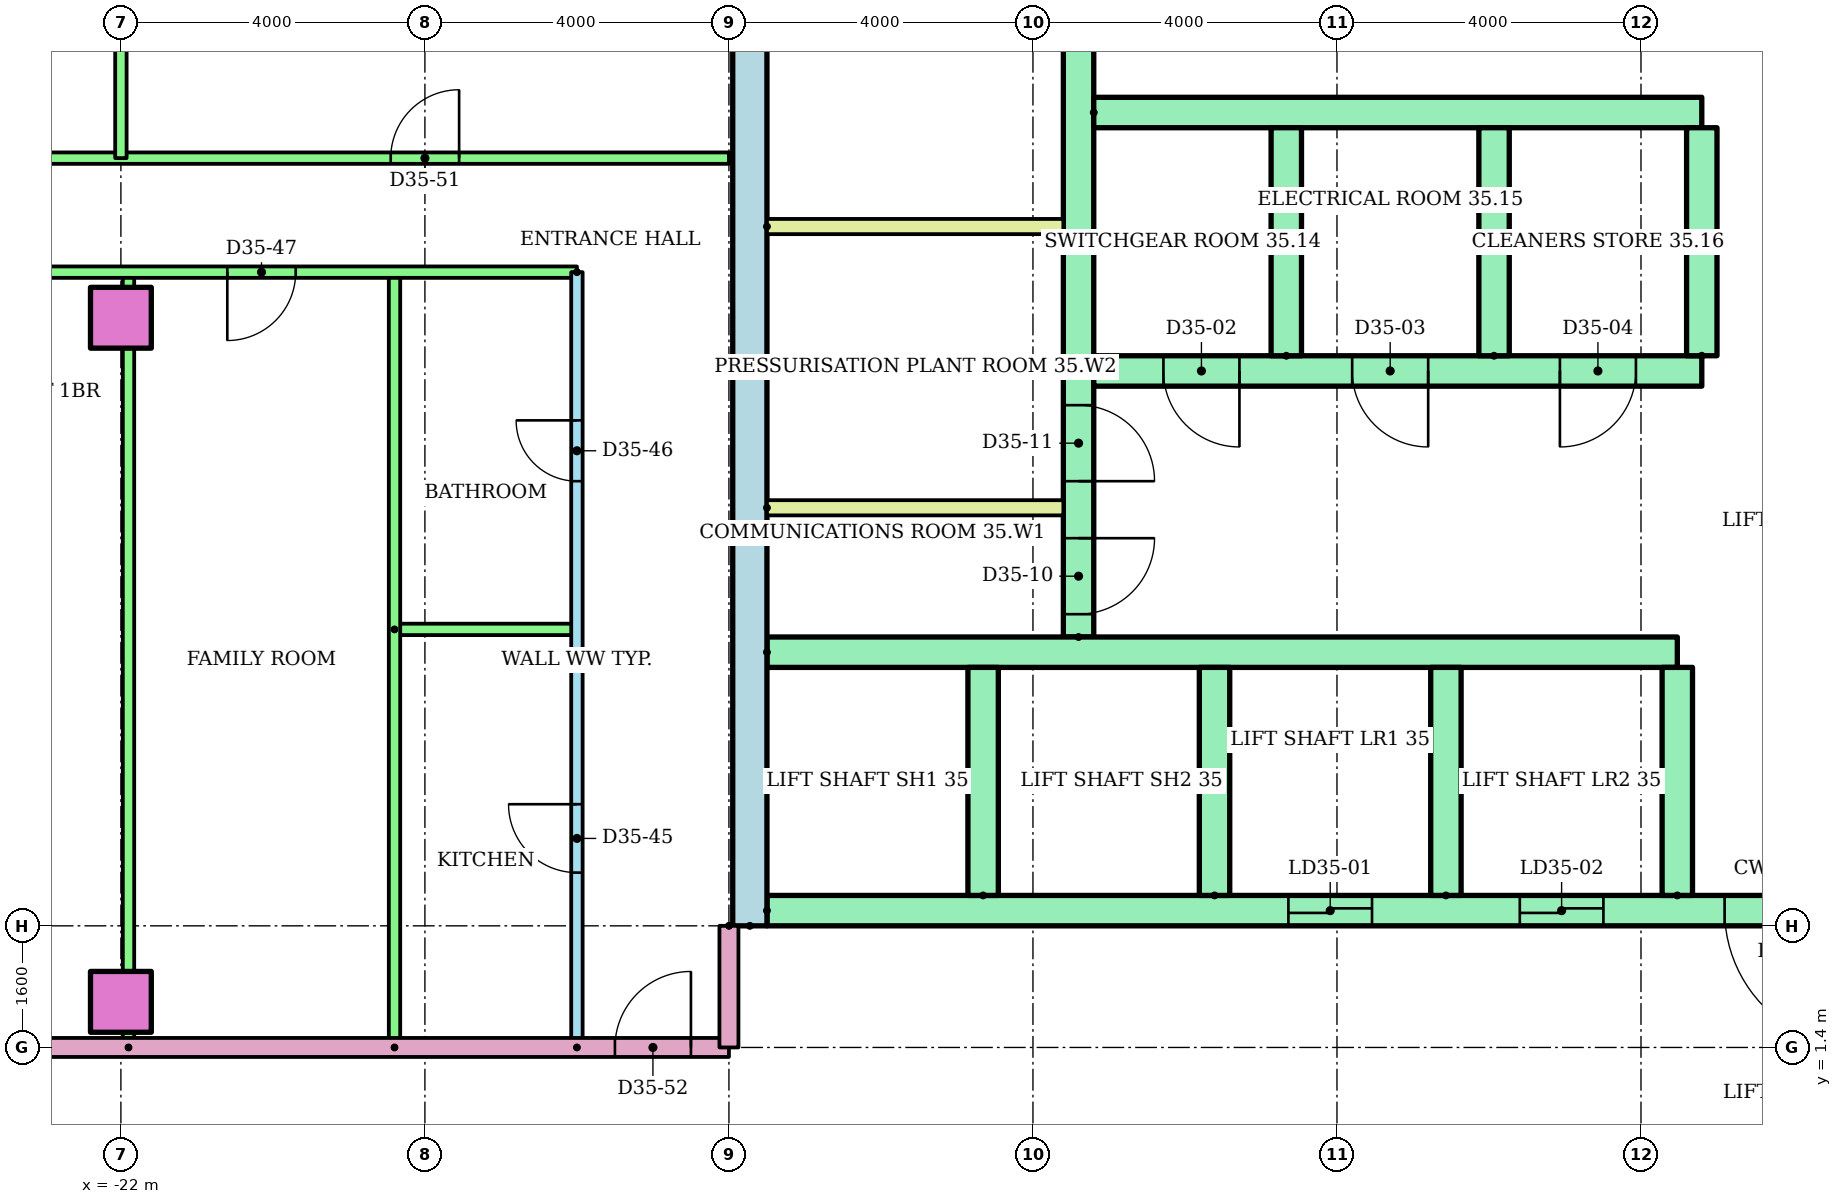
"""IFC4 building model, lengths in metres.
Left out: names, types, materials, properties, quantities, classifications, styles, units other than length and angle.
Written with IfcOpenShell. Run it as: python <this file> out.ifc"""

import sys

from ifc_helpers import new_model, si_unit, direction, frame, frame_2d, origin, origin_2d, place, context, subcontext, project, spatial, rectangle, extrude, element, fill, save


model = new_model("IFC4")
c1 = context("Model", 3, precision=1e-05, world=origin(), true_north=direction((0.0, 1.0)))
c2 = subcontext(c1, "Body", "Model", "MODEL_VIEW")
j1 = project(units=[si_unit("LENGTHUNIT", "METRE"), si_unit("PLANEANGLEUNIT", "RADIAN")], contexts=[c1])
p1 = place(None, origin())
s1 = spatial("IfcSite", under=j1, at=p1, CompositionType="ELEMENT")
p2 = place(p1, origin())
s2 = spatial("IfcBuilding", under=s1, at=p2, CompositionType="ELEMENT")
p3 = place(p2, frame((0.0, 0.0, 135.8)))
s3 = spatial("IfcBuildingStorey", under=s2, at=p3, CompositionType="ELEMENT", Elevation=135.8)
for number, where in (
    (1, (-22.0, 2.0, 0.0)),
    (2, (-22.0, 11.0, 0.0)),
):
    element("IfcColumn", number, at=place(p3, frame(where)), inside=s3, PredefinedType="COLUMN", context=c2, shape_type="SweptSolid", body=[
        extrude(rectangle(XDim=0.8, YDim=0.8, at=origin_2d()), origin(), (0.0, 0.0, 1.0), 3.2),
    ])
p4 = place(p3, frame((-13.725, 3.0, 0.0), z_axis=(0.0, 0.0, 1.0), x_axis=(0.0, 1.0, 0.0)))
e3 = element("IfcWall", 3, at=p4, inside=s3, PredefinedType="SHEAR", context=c2, shape_type="SweptSolid", body=[
    extrude(rectangle(XDim=17.0, YDim=0.45, at=frame_2d((8.5, 0.0))), origin(), (0.0, 0.0, 1.0), 2.92),
])
p5 = place(p3, frame((-9.4, 6.8, 0.0), z_axis=(0.0, 0.0, 1.0), x_axis=(0.0, 1.0, 0.0)))
e4 = element("IfcWall", 4, at=p5, inside=s3, PredefinedType="SHEAR", context=c2, shape_type="SweptSolid", body=[
    extrude(rectangle(XDim=12.7, YDim=0.4, at=frame_2d((6.35, 0.0))), origin(), (0.0, 0.0, 1.0), 2.92),
])
p6 = place(p5, frame((0.3, 0.0, 0.0)))
e5 = element("IfcOpeningElement", 5, at=p6, cuts=e4, PredefinedType="OPENING", context=c2, shape_type="SweptSolid", body=[
    extrude(rectangle(XDim=1.0, YDim=2.1, at=frame_2d((0.5, 1.05))), frame((0.0, 0.21, 0.0), z_axis=(0.0, -1.0, 0.0), x_axis=(1.0, 0.0, 0.0)), (0.0, 0.0, 1.0), 0.42),
])
p7 = place(p5, frame((2.05, 0.0, 0.0)))
e6 = element("IfcOpeningElement", 6, at=p7, cuts=e4, PredefinedType="OPENING", context=c2, shape_type="SweptSolid", body=[
    extrude(rectangle(XDim=1.0, YDim=2.1, at=frame_2d((0.5, 1.05))), frame((0.0, 0.21, 0.0), z_axis=(0.0, -1.0, 0.0), x_axis=(1.0, 0.0, 0.0)), (0.0, 0.0, 1.0), 0.42),
])
p8 = place(p5, frame((7.925, 0.0, 0.0)))
e7 = element("IfcOpeningElement", 7, at=p8, cuts=e4, PredefinedType="OPENING", context=c2, shape_type="SweptSolid", body=[
    extrude(rectangle(XDim=1.0, YDim=2.1, at=frame_2d((0.5, 1.05))), frame((0.0, 0.21, 0.0), z_axis=(0.0, -1.0, 0.0), x_axis=(1.0, 0.0, 0.0)), (0.0, 0.0, 1.0), 0.42),
])
p9 = place(p3, frame((-13.5, 3.2, 0.0)))
e8 = element("IfcWall", 8, at=p9, inside=s3, PredefinedType="SHEAR", context=c2, shape_type="SweptSolid", body=[
    extrude(rectangle(XDim=27.0, YDim=0.4, at=frame_2d((13.5, 0.0))), origin(), (0.0, 0.0, 1.0), 2.92),
])
p10 = place(p9, frame((6.861, 0.0, 0.0)))
e9 = element("IfcOpeningElement", 9, at=p10, cuts=e8, PredefinedType="OPENING", context=c2, shape_type="SweptSolid", body=[
    extrude(rectangle(XDim=1.1, YDim=2.1, at=frame_2d((0.55, 1.05))), frame((0.0, 0.21, 0.0), z_axis=(0.0, -1.0, 0.0), x_axis=(1.0, 0.0, 0.0)), (0.0, 0.0, 1.0), 0.42),
])
p11 = place(p9, frame((9.906, 0.0, 0.0)))
e10 = element("IfcOpeningElement", 10, at=p11, cuts=e8, PredefinedType="OPENING", context=c2, shape_type="SweptSolid", body=[
    extrude(rectangle(XDim=1.1, YDim=2.1, at=frame_2d((0.55, 1.05))), frame((0.0, 0.21, 0.0), z_axis=(0.0, -1.0, 0.0), x_axis=(1.0, 0.0, 0.0)), (0.0, 0.0, 1.0), 0.42),
])
p12 = place(p9, frame((15.994, 0.0, 0.0)))
e11 = element("IfcOpeningElement", 11, at=p12, cuts=e8, PredefinedType="OPENING", context=c2, shape_type="SweptSolid", body=[
    extrude(rectangle(XDim=1.1, YDim=2.1, at=frame_2d((0.55, 1.05))), frame((0.0, 0.21, 0.0), z_axis=(0.0, -1.0, 0.0), x_axis=(1.0, 0.0, 0.0)), (0.0, 0.0, 1.0), 0.42),
])
p13 = place(p9, frame((19.039, 0.0, 0.0)))
e12 = element("IfcOpeningElement", 12, at=p13, cuts=e8, PredefinedType="OPENING", context=c2, shape_type="SweptSolid", body=[
    extrude(rectangle(XDim=1.1, YDim=2.1, at=frame_2d((0.55, 1.05))), frame((0.0, 0.21, 0.0), z_axis=(0.0, -1.0, 0.0), x_axis=(1.0, 0.0, 0.0)), (0.0, 0.0, 1.0), 0.42),
])
p14 = place(p9, frame((12.6, 0.0, 0.0)))
e13 = element("IfcOpeningElement", 13, at=p14, cuts=e8, PredefinedType="OPENING", context=c2, shape_type="SweptSolid", body=[
    extrude(rectangle(XDim=1.8, YDim=2.1, at=frame_2d((0.9, 1.05))), frame((0.0, 0.21, 0.0), z_axis=(0.0, -1.0, 0.0), x_axis=(1.0, 0.0, 0.0)), (0.0, 0.0, 1.0), 0.42),
])
p15 = place(p3, frame((-13.5, 6.6, 0.0)))
e14 = element("IfcWall", 14, at=p15, inside=s3, PredefinedType="SHEAR", context=c2, shape_type="SweptSolid", body=[
    extrude(rectangle(XDim=11.978, YDim=0.4, at=frame_2d((5.989, 0.0))), origin(), (0.0, 0.0, 1.0), 2.92),
])
for number, where, z_axis, x_axis in (
    (15, (-10.656, 3.4, 0.0), (0.0, 0.0, 1.0), (0.0, 1.0, 0.0)),
    (16, (-7.611, 3.4, 0.0), (0.0, 0.0, 1.0), (0.0, 1.0, 0.0)),
    (17, (-4.567, 3.4, 0.0), (0.0, 0.0, 1.0), (0.0, 1.0, 0.0)),
    (18, (-1.522, 3.4, 0.0), (0.0, 0.0, 1.0), (0.0, 1.0, 0.0)),
):
    element("IfcWall", number, at=place(p3, frame(where, z_axis=z_axis, x_axis=x_axis)), inside=s3, PredefinedType="SHEAR", context=c2, shape_type="SweptSolid", body=[
        extrude(rectangle(XDim=3.0, YDim=0.4, at=frame_2d((1.5, 0.0))), origin(), (0.0, 0.0, 1.0), 2.92),
    ])
p16 = place(p3, frame((-9.2, 10.3, 0.0)))
e19 = element("IfcWall", 19, at=p16, inside=s3, PredefinedType="SHEAR", context=c2, shape_type="SweptSolid", body=[
    extrude(rectangle(XDim=8.0, YDim=0.4, at=frame_2d((4.0, 0.0))), origin(), (0.0, 0.0, 1.0), 2.92),
])
p17 = place(p16, frame((0.917, 0.0, 0.0)))
e20 = element("IfcOpeningElement", 20, at=p17, cuts=e19, PredefinedType="OPENING", context=c2, shape_type="SweptSolid", body=[
    extrude(rectangle(XDim=1.0, YDim=2.1, at=frame_2d((0.5, 1.05))), frame((0.0, 0.21, 0.0), z_axis=(0.0, -1.0, 0.0), x_axis=(1.0, 0.0, 0.0)), (0.0, 0.0, 1.0), 0.42),
])
p18 = place(p16, frame((3.4, 0.0, 0.0)))
e21 = element("IfcOpeningElement", 21, at=p18, cuts=e19, PredefinedType="OPENING", context=c2, shape_type="SweptSolid", body=[
    extrude(rectangle(XDim=1.0, YDim=2.1, at=frame_2d((0.5, 1.05))), frame((0.0, 0.21, 0.0), z_axis=(0.0, -1.0, 0.0), x_axis=(1.0, 0.0, 0.0)), (0.0, 0.0, 1.0), 0.42),
])
p19 = place(p16, frame((6.133, 0.0, 0.0)))
e22 = element("IfcOpeningElement", 22, at=p19, cuts=e19, PredefinedType="OPENING", context=c2, shape_type="SweptSolid", body=[
    extrude(rectangle(XDim=1.0, YDim=2.1, at=frame_2d((0.5, 1.05))), frame((0.0, 0.21, 0.0), z_axis=(0.0, -1.0, 0.0), x_axis=(1.0, 0.0, 0.0)), (0.0, 0.0, 1.0), 0.42),
])
p20 = place(p3, frame((-9.2, 13.7, 0.0)))
e23 = element("IfcWall", 23, at=p20, inside=s3, PredefinedType="SHEAR", context=c2, shape_type="SweptSolid", body=[
    extrude(rectangle(XDim=8.0, YDim=0.4, at=frame_2d((4.0, 0.0))), origin(), (0.0, 0.0, 1.0), 2.92),
])
for number, where, z_axis, x_axis in (
    (24, (-6.667, 10.5, 0.0), (0.0, 0.0, 1.0), (0.0, 1.0, 0.0)),
    (25, (-3.933, 10.5, 0.0), (0.0, 0.0, 1.0), (0.0, 1.0, 0.0)),
    (26, (-1.2, 10.5, 0.0), (0.0, 0.0, 1.0), (0.0, 1.0, 0.0)),
):
    element("IfcWall", number, at=place(p3, frame(where, z_axis=z_axis, x_axis=x_axis)), inside=s3, PredefinedType="SHEAR", context=c2, shape_type="SweptSolid", body=[
        extrude(rectangle(XDim=3.0, YDim=0.4, at=frame_2d((1.5, 0.0))), origin(), (0.0, 0.0, 1.0), 2.92),
    ])
for number, where in (
    (27, (-13.5, 8.5, 0.0)),
    (28, (-13.5, 12.2, 0.0)),
):
    element("IfcWall", number, at=place(p3, frame(where)), inside=s3, PredefinedType="PARTITIONING", context=c2, shape_type="SweptSolid", body=[
        extrude(rectangle(XDim=3.9, YDim=0.2, at=frame_2d((1.95, 0.0))), origin(), (0.0, 0.0, 1.0), 2.92),
    ])
p21 = place(p3, frame((-16.0, 1.4, 0.0), z_axis=(0.0, 0.0, 1.0), x_axis=(0.0, 1.0, 0.0)))
e29 = element("IfcWall", 29, at=p21, inside=s3, PredefinedType="PARTITIONING", context=c2, shape_type="SweptSolid", body=[
    extrude(rectangle(XDim=10.2, YDim=0.15, at=frame_2d((5.1, 0.0))), origin(), (0.0, 0.0, 1.0), 2.4),
])
p22 = place(p21, frame((2.3, 0.0, 0.0)))
e30 = element("IfcOpeningElement", 30, at=p22, cuts=e29, PredefinedType="OPENING", context=c2, shape_type="SweptSolid", body=[
    extrude(rectangle(XDim=0.9, YDim=2.1, at=frame_2d((0.45, 1.05))), frame((0.0, 0.085, 0.0), z_axis=(0.0, -1.0, 0.0), x_axis=(1.0, 0.0, 0.0)), (0.0, 0.0, 1.0), 0.17),
])
p23 = place(p21, frame((7.45, 0.0, 0.0)))
e31 = element("IfcOpeningElement", 31, at=p23, cuts=e29, PredefinedType="OPENING", context=c2, shape_type="SweptSolid", body=[
    extrude(rectangle(XDim=0.8, YDim=2.1, at=frame_2d((0.4, 1.05))), frame((0.0, 0.085, 0.0), z_axis=(0.0, -1.0, 0.0), x_axis=(1.0, 0.0, 0.0)), (0.0, 0.0, 1.0), 0.17),
])
p24 = place(p3, frame((-18.4, 6.9, 0.0)))
e32 = element("IfcWall", 32, at=p24, inside=s3, PredefinedType="PARTITIONING", context=c2, shape_type="SweptSolid", body=[
    extrude(rectangle(XDim=2.4, YDim=0.15, at=frame_2d((1.2, 0.0))), origin(), (0.0, 0.0, 1.0), 2.4),
])
for number, where, z_axis, x_axis in (
    (33, (-18.4, 1.4, 0.0), (0.0, 0.0, 1.0), (0.0, 1.0, 0.0)),
    (34, (-21.9, 1.4, 0.0), (0.0, 0.0, 1.0), (0.0, 1.0, 0.0)),
):
    element("IfcWall", number, at=place(p3, frame(where, z_axis=z_axis, x_axis=x_axis)), inside=s3, PredefinedType="PARTITIONING", context=c2, shape_type="SweptSolid", body=[
        extrude(rectangle(XDim=10.2, YDim=0.15, at=frame_2d((5.1, 0.0))), origin(), (0.0, 0.0, 1.0), 2.4),
    ])
p25 = place(p3, frame((-16.0, 11.6, 0.0), z_axis=(0.0, 0.0, 1.0), x_axis=(-1.0, 0.0, 0.0)))
e35 = element("IfcWall", 35, at=p25, inside=s3, PredefinedType="PARTITIONING", context=c2, shape_type="SweptSolid", body=[
    extrude(rectangle(XDim=16.72, YDim=0.15, at=frame_2d((8.36, 0.0))), origin(), (0.0, 0.0, 1.0), 2.4),
])
p26 = place(p25, frame((3.7, 0.0, 0.0)))
e36 = element("IfcOpeningElement", 36, at=p26, cuts=e35, PredefinedType="OPENING", context=c2, shape_type="SweptSolid", body=[
    extrude(rectangle(XDim=0.9, YDim=2.1, at=frame_2d((0.45, 1.05))), frame((0.0, 0.085, 0.0), z_axis=(0.0, -1.0, 0.0), x_axis=(1.0, 0.0, 0.0)), (0.0, 0.0, 1.0), 0.17),
])
p27 = place(p25, frame((7.825, 0.0, 0.0)))
e37 = element("IfcOpeningElement", 37, at=p27, cuts=e35, PredefinedType="OPENING", context=c2, shape_type="SweptSolid", body=[
    extrude(rectangle(XDim=0.9, YDim=2.1, at=frame_2d((0.45, 1.05))), frame((0.0, 0.085, 0.0), z_axis=(0.0, -1.0, 0.0), x_axis=(1.0, 0.0, 0.0)), (0.0, 0.0, 1.0), 0.17),
])
p28 = place(p25, frame((12.482, 0.0, 0.0)))
e38 = element("IfcOpeningElement", 38, at=p28, cuts=e35, PredefinedType="OPENING", context=c2, shape_type="SweptSolid", body=[
    extrude(rectangle(XDim=0.9, YDim=2.1, at=frame_2d((0.45, 1.05))), frame((0.0, 0.085, 0.0), z_axis=(0.0, -1.0, 0.0), x_axis=(1.0, 0.0, 0.0)), (0.0, 0.0, 1.0), 0.17),
])
p29 = place(p3, frame((-32.72, 13.1, 0.0)))
e39 = element("IfcWall", 39, at=p29, inside=s3, PredefinedType="PARTITIONING", context=c2, shape_type="SweptSolid", body=[
    extrude(rectangle(XDim=18.72, YDim=0.15, at=frame_2d((9.36, 0.0))), origin(), (0.0, 0.0, 1.0), 2.4),
])
p30 = place(p29, frame((4.97, 0.0, 0.0)))
e40 = element("IfcOpeningElement", 40, at=p30, cuts=e39, PredefinedType="OPENING", context=c2, shape_type="SweptSolid", body=[
    extrude(rectangle(XDim=1.0, YDim=2.1, at=frame_2d((0.5, 1.05))), frame((0.0, 0.085, 0.0), z_axis=(0.0, -1.0, 0.0), x_axis=(1.0, 0.0, 0.0)), (0.0, 0.0, 1.0), 0.17),
])
p31 = place(p29, frame((14.27, 0.0, 0.0)))
e41 = element("IfcOpeningElement", 41, at=p31, cuts=e39, PredefinedType="OPENING", context=c2, shape_type="SweptSolid", body=[
    extrude(rectangle(XDim=0.9, YDim=2.1, at=frame_2d((0.45, 1.05))), frame((0.0, 0.085, 0.0), z_axis=(0.0, -1.0, 0.0), x_axis=(1.0, 0.0, 0.0)), (0.0, 0.0, 1.0), 0.17),
])
p32 = place(p3, frame((-22.0, 18.721, 0.0), z_axis=(0.0, 0.0, 1.0), x_axis=(0.0, -1.0, 0.0)))
e42 = element("IfcWall", 42, at=p32, inside=s3, PredefinedType="PARTITIONING", context=c2, shape_type="SweptSolid", body=[
    extrude(rectangle(XDim=5.621, YDim=0.15, at=frame_2d((2.811, 0.0))), origin(), (0.0, 0.0, 1.0), 2.4),
])
p33 = place(p3, frame((-29.0, 1.4, 0.0)))
e43 = element("IfcWall", 43, at=p33, inside=s3, PredefinedType="PARTITIONING", context=c2, shape_type="SweptSolid", body=[
    extrude(rectangle(XDim=15.0, YDim=0.25, at=frame_2d((7.5, 0.0))), origin(), (0.0, 0.0, 1.0), 2.4),
])
p34 = place(p33, frame((13.5, 0.0, 0.0)))
e44 = element("IfcOpeningElement", 44, at=p34, cuts=e43, PredefinedType="OPENING", context=c2, shape_type="SweptSolid", body=[
    extrude(rectangle(XDim=1.0, YDim=2.1, at=frame_2d((0.5, 1.05))), frame((0.0, 0.135, 0.0), z_axis=(0.0, -1.0, 0.0), x_axis=(1.0, 0.0, 0.0)), (0.0, 0.0, 1.0), 0.27),
])
p35 = place(p3, frame((-14.0, 3.0, 0.0), z_axis=(0.0, 0.0, 1.0), x_axis=(0.0, -1.0, 0.0)))
e45 = element("IfcWall", 45, at=p35, inside=s3, PredefinedType="PARTITIONING", context=c2, shape_type="SweptSolid", body=[
    extrude(rectangle(XDim=1.6, YDim=0.25, at=frame_2d((0.8, 0.0))), origin(), (0.0, 0.0, 1.0), 2.4),
])
p36 = place(p10, origin())
e46 = element("IfcDoor", 46, at=p36, inside=s3, OperationType="SLIDING_TO_LEFT", PredefinedType="DOOR", context=c2, shape_type="SweptSolid", body=[
    extrude(rectangle(XDim=1.1, YDim=2.1, at=frame_2d((0.55, 1.05))), frame((0.0, 0.025, 0.0), z_axis=(0.0, -1.0, 0.0), x_axis=(1.0, 0.0, 0.0)), (0.0, 0.0, 1.0), 0.05),
])
fill(e9, e46)
p37 = place(p11, origin())
e47 = element("IfcDoor", 47, at=p37, inside=s3, OperationType="SLIDING_TO_LEFT", PredefinedType="DOOR", context=c2, shape_type="SweptSolid", body=[
    extrude(rectangle(XDim=1.1, YDim=2.1, at=frame_2d((0.55, 1.05))), frame((0.0, 0.025, 0.0), z_axis=(0.0, -1.0, 0.0), x_axis=(1.0, 0.0, 0.0)), (0.0, 0.0, 1.0), 0.05),
])
fill(e10, e47)
p38 = place(p14, frame((1.8, 0.0, 0.0), z_axis=(0.0, 0.0, 1.0), x_axis=(-1.0, 0.0, 0.0)))
e48 = element("IfcDoor", 48, at=p38, inside=s3, OperationType="DOUBLE_DOOR_SINGLE_SWING", PredefinedType="DOOR", context=c2, shape_type="SweptSolid", body=[
    extrude(rectangle(XDim=1.8, YDim=2.1, at=frame_2d((0.9, 1.05))), frame((0.0, 0.025, 0.0), z_axis=(0.0, -1.0, 0.0), x_axis=(1.0, 0.0, 0.0)), (0.0, 0.0, 1.0), 0.05),
])
fill(e13, e48)
p39 = place(p17, frame((1.0, 0.0, 0.0), z_axis=(0.0, 0.0, 1.0), x_axis=(-1.0, 0.0, 0.0)))
e49 = element("IfcDoor", 49, at=p39, inside=s3, OperationType="SINGLE_SWING_RIGHT", PredefinedType="DOOR", context=c2, shape_type="SweptSolid", body=[
    extrude(rectangle(XDim=1.0, YDim=2.1, at=frame_2d((0.5, 1.05))), frame((0.0, 0.025, 0.0), z_axis=(0.0, -1.0, 0.0), x_axis=(1.0, 0.0, 0.0)), (0.0, 0.0, 1.0), 0.05),
])
fill(e20, e49)
p40 = place(p18, frame((1.0, 0.0, 0.0), z_axis=(0.0, 0.0, 1.0), x_axis=(-1.0, 0.0, 0.0)))
e50 = element("IfcDoor", 50, at=p40, inside=s3, OperationType="SINGLE_SWING_RIGHT", PredefinedType="DOOR", context=c2, shape_type="SweptSolid", body=[
    extrude(rectangle(XDim=1.0, YDim=2.1, at=frame_2d((0.5, 1.05))), frame((0.0, 0.025, 0.0), z_axis=(0.0, -1.0, 0.0), x_axis=(1.0, 0.0, 0.0)), (0.0, 0.0, 1.0), 0.05),
])
fill(e21, e50)
p41 = place(p19, frame((1.0, 0.0, 0.0), z_axis=(0.0, 0.0, 1.0), x_axis=(-1.0, 0.0, 0.0)))
e51 = element("IfcDoor", 51, at=p41, inside=s3, OperationType="SINGLE_SWING_LEFT", PredefinedType="DOOR", context=c2, shape_type="SweptSolid", body=[
    extrude(rectangle(XDim=1.0, YDim=2.1, at=frame_2d((0.5, 1.05))), frame((0.0, 0.025, 0.0), z_axis=(0.0, -1.0, 0.0), x_axis=(1.0, 0.0, 0.0)), (0.0, 0.0, 1.0), 0.05),
])
fill(e22, e51)
p42 = place(p6, frame((1.0, 0.0, 0.0), z_axis=(0.0, 0.0, 1.0), x_axis=(-1.0, 0.0, 0.0)))
e52 = element("IfcDoor", 52, at=p42, inside=s3, OperationType="SINGLE_SWING_RIGHT", PredefinedType="DOOR", context=c2, shape_type="SweptSolid", body=[
    extrude(rectangle(XDim=1.0, YDim=2.1, at=frame_2d((0.5, 1.05))), frame((0.0, 0.025, 0.0), z_axis=(0.0, -1.0, 0.0), x_axis=(1.0, 0.0, 0.0)), (0.0, 0.0, 1.0), 0.05),
])
fill(e5, e52)
p43 = place(p7, frame((1.0, 0.0, 0.0), z_axis=(0.0, 0.0, 1.0), x_axis=(-1.0, 0.0, 0.0)))
e53 = element("IfcDoor", 53, at=p43, inside=s3, OperationType="SINGLE_SWING_LEFT", PredefinedType="DOOR", context=c2, shape_type="SweptSolid", body=[
    extrude(rectangle(XDim=1.0, YDim=2.1, at=frame_2d((0.5, 1.05))), frame((0.0, 0.025, 0.0), z_axis=(0.0, -1.0, 0.0), x_axis=(1.0, 0.0, 0.0)), (0.0, 0.0, 1.0), 0.05),
])
fill(e6, e53)
p44 = place(p22, origin())
e54 = element("IfcDoor", 54, at=p44, inside=s3, OperationType="SINGLE_SWING_RIGHT", PredefinedType="DOOR", context=c2, shape_type="SweptSolid", body=[
    extrude(rectangle(XDim=0.9, YDim=2.1, at=frame_2d((0.45, 1.05))), frame((0.0, 0.025, 0.0), z_axis=(0.0, -1.0, 0.0), x_axis=(1.0, 0.0, 0.0)), (0.0, 0.0, 1.0), 0.05),
])
fill(e30, e54)
p45 = place(p23, origin())
e55 = element("IfcDoor", 55, at=p45, inside=s3, OperationType="SINGLE_SWING_RIGHT", PredefinedType="DOOR", context=c2, shape_type="SweptSolid", body=[
    extrude(rectangle(XDim=0.8, YDim=2.1, at=frame_2d((0.4, 1.05))), frame((0.0, 0.025, 0.0), z_axis=(0.0, -1.0, 0.0), x_axis=(1.0, 0.0, 0.0)), (0.0, 0.0, 1.0), 0.05),
])
fill(e31, e55)
p46 = place(p26, origin())
e56 = element("IfcDoor", 56, at=p46, inside=s3, OperationType="SINGLE_SWING_RIGHT", PredefinedType="DOOR", context=c2, shape_type="SweptSolid", body=[
    extrude(rectangle(XDim=0.9, YDim=2.1, at=frame_2d((0.45, 1.05))), frame((0.0, 0.025, 0.0), z_axis=(0.0, -1.0, 0.0), x_axis=(1.0, 0.0, 0.0)), (0.0, 0.0, 1.0), 0.05),
])
fill(e36, e56)
p47 = place(p31, origin())
e57 = element("IfcDoor", 57, at=p47, inside=s3, OperationType="SINGLE_SWING_RIGHT", PredefinedType="DOOR", context=c2, shape_type="SweptSolid", body=[
    extrude(rectangle(XDim=0.9, YDim=2.1, at=frame_2d((0.45, 1.05))), frame((0.0, 0.025, 0.0), z_axis=(0.0, -1.0, 0.0), x_axis=(1.0, 0.0, 0.0)), (0.0, 0.0, 1.0), 0.05),
])
fill(e41, e57)
p48 = place(p34, origin())
e58 = element("IfcDoor", 58, at=p48, inside=s3, OperationType="SINGLE_SWING_RIGHT", PredefinedType="DOOR", context=c2, shape_type="SweptSolid", body=[
    extrude(rectangle(XDim=1.0, YDim=2.1, at=frame_2d((0.5, 1.05))), frame((0.0, 0.025, 0.0), z_axis=(0.0, -1.0, 0.0), x_axis=(1.0, 0.0, 0.0)), (0.0, 0.0, 1.0), 0.05),
])
fill(e44, e58)
save(model, sys.argv[1])
